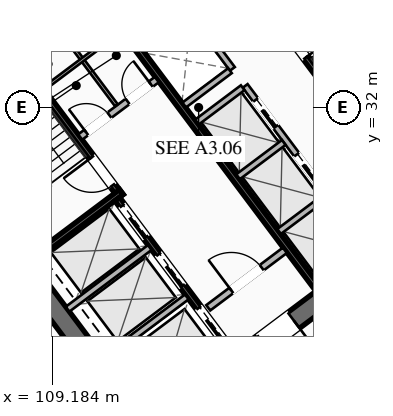
"""IFC4 building model, lengths in metres.
Left out: names, types, materials, properties, quantities, classifications, styles, units other than length and angle.
Written with IfcOpenShell. Run it as: python <this file> out.ifc"""

import sys

from ifc_helpers import new_model, si_unit, direction, frame, frame_2d, origin, place, context, subcontext, project, spatial, rectangle, extrude, element, fill, save


model = new_model("IFC4")
c1 = context("Model", 3, precision=1e-05, world=origin(), true_north=direction((0.0, 1.0)))
c2 = subcontext(c1, "Body", "Model", "MODEL_VIEW")
j1 = project(units=[si_unit("LENGTHUNIT", "METRE"), si_unit("PLANEANGLEUNIT", "RADIAN")], contexts=[c1])
p1 = place(None, origin())
s1 = spatial("IfcSite", under=j1, at=p1, CompositionType="ELEMENT")
p2 = place(p1, origin())
s2 = spatial("IfcBuilding", under=s1, at=p2, CompositionType="ELEMENT")
p3 = place(p2, frame((0.0, 0.0, 88.5)))
s3 = spatial("IfcBuildingStorey", under=s2, at=p3, CompositionType="ELEMENT", Elevation=88.5)
for number, where, z_axis, x_axis in (
    (1, (112.476, 21.107, 0.0), (0.0, 0.0, 1.0), (-0.6, 0.8, 0.0)),
    (2, (115.524, 42.893, 0.0), (0.0, 0.0, 1.0), (0.6, -0.8, 0.0)),
):
    element("IfcWall", number, at=place(p3, frame(where, z_axis=z_axis, x_axis=x_axis)), inside=s3, PredefinedType="SHEAR", context=c2, shape_type="SweptSolid", body=[
        extrude(rectangle(XDim=15.6, YDim=0.65, at=frame_2d((7.8, 0.0))), origin(), (0.0, 0.0, 1.0), 3.55),
    ])
p4 = place(p3, frame((124.429, 30.478, 0.0), z_axis=(0.0, 0.0, 1.0), x_axis=(-0.799998028465, -0.600002628705, 0.0)))
e3 = element("IfcWall", 3, at=p4, inside=s3, PredefinedType="SHEAR", context=c2, shape_type="SweptSolid", body=[
    extrude(rectangle(XDim=14.86, YDim=0.65, at=frame_2d((7.43, 0.0))), origin(), (0.0, 0.0, 1.0), 3.55),
])
p5 = place(p4, frame((9.13, 0.0, 0.0)))
e4 = element("IfcOpeningElement", 4, at=p5, cuts=e3, PredefinedType="OPENING", context=c2, shape_type="SweptSolid", body=[
    extrude(rectangle(XDim=1.25, YDim=2.25, at=frame_2d((0.625, 1.125))), frame((0.0, 0.335, 0.0), z_axis=(0.0, -1.0, 0.0), x_axis=(1.0, 0.0, 0.0)), (0.0, 0.0, 1.0), 0.67),
])
p6 = place(p4, frame((4.08, 0.0, 0.0)))
e5 = element("IfcOpeningElement", 5, at=p6, cuts=e3, PredefinedType="OPENING", context=c2, shape_type="SweptSolid", body=[
    extrude(rectangle(XDim=1.25, YDim=2.25, at=frame_2d((0.625, 1.125))), frame((0.0, 0.335, 0.0), z_axis=(0.0, -1.0, 0.0), x_axis=(1.0, 0.0, 0.0)), (0.0, 0.0, 1.0), 0.67),
])
p7 = place(p3, frame((103.571, 33.522, 0.0), z_axis=(0.0, 0.0, 1.0), x_axis=(0.799998028465, 0.600002628705, 0.0)))
e6 = element("IfcWall", 6, at=p7, inside=s3, PredefinedType="SHEAR", context=c2, shape_type="SweptSolid", body=[
    extrude(rectangle(XDim=14.86, YDim=0.65, at=frame_2d((7.43, 0.0))), origin(), (0.0, 0.0, 1.0), 3.55),
])
p8 = place(p7, frame((4.48, 0.0, 0.0)))
e7 = element("IfcOpeningElement", 7, at=p8, cuts=e6, PredefinedType="OPENING", context=c2, shape_type="SweptSolid", body=[
    extrude(rectangle(XDim=1.25, YDim=2.25, at=frame_2d((0.625, 1.125))), frame((0.0, 0.335, 0.0), z_axis=(0.0, -1.0, 0.0), x_axis=(1.0, 0.0, 0.0)), (0.0, 0.0, 1.0), 0.67),
])
p9 = place(p7, frame((9.53, 0.0, 0.0)))
e8 = element("IfcOpeningElement", 8, at=p9, cuts=e6, PredefinedType="OPENING", context=c2, shape_type="SweptSolid", body=[
    extrude(rectangle(XDim=1.25, YDim=2.25, at=frame_2d((0.625, 1.125))), frame((0.0, 0.335, 0.0), z_axis=(0.0, -1.0, 0.0), x_axis=(1.0, 0.0, 0.0)), (0.0, 0.0, 1.0), 0.67),
])
p10 = place(p3, frame((111.44, 29.08, 0.0), z_axis=(0.0, 0.0, 1.0), x_axis=(-0.600009827119, 0.799992629566, 0.0)))
e9 = element("IfcWall", 9, at=p10, inside=s3, PredefinedType="SHEAR", context=c2, shape_type="SweptSolid", body=[
    extrude(rectangle(XDim=7.95, YDim=0.2, at=frame_2d((3.975, 0.0))), origin(), (0.0, 0.0, 1.0), 3.35),
])
p11 = place(p10, frame((0.45, 0.0, 0.0)))
e10 = element("IfcOpeningElement", 10, at=p11, cuts=e9, PredefinedType="OPENING", context=c2, shape_type="SweptSolid", body=[
    extrude(rectangle(XDim=1.15, YDim=2.2, at=frame_2d((0.575, 1.1))), frame((0.0, 0.11, 0.0), z_axis=(0.0, -1.0, 0.0), x_axis=(1.0, 0.0, 0.0)), (0.0, 0.0, 1.0), 0.22),
])
p12 = place(p3, frame((108.476, 26.982, 0.0), z_axis=(0.0, 0.0, 1.0), x_axis=(0.799984290658, 0.600020945218, 0.0)))
e11 = element("IfcWall", 11, at=p12, inside=s3, PredefinedType="SHEAR", context=c2, shape_type="SweptSolid", body=[
    extrude(rectangle(XDim=3.73, YDim=0.2, at=frame_2d((1.865, 0.0))), origin(), (0.0, 0.0, 1.0), 3.35),
])
p13 = place(p3, frame((116.56, 34.92, 0.0), z_axis=(0.0, 0.0, 1.0), x_axis=(0.600009827119, -0.799992629566, 0.0)))
e12 = element("IfcWall", 12, at=p13, inside=s3, PredefinedType="SHEAR", context=c2, shape_type="SweptSolid", body=[
    extrude(rectangle(XDim=7.95, YDim=0.2, at=frame_2d((3.975, 0.0))), origin(), (0.0, 0.0, 1.0), 3.35),
])
p14 = place(p13, frame((0.45, 0.0, 0.0)))
e13 = element("IfcOpeningElement", 13, at=p14, cuts=e12, PredefinedType="OPENING", context=c2, shape_type="SweptSolid", body=[
    extrude(rectangle(XDim=1.15, YDim=2.2, at=frame_2d((0.575, 1.1))), frame((0.0, 0.11, 0.0), z_axis=(0.0, -1.0, 0.0), x_axis=(1.0, 0.0, 0.0)), (0.0, 0.0, 1.0), 0.22),
])
p15 = place(p3, frame((117.938, 26.016, 0.0), z_axis=(0.0, 0.0, 1.0), x_axis=(-0.600005463273, 0.799995902516, 0.0)))
e14 = element("IfcWall", 14, at=p15, inside=s3, PredefinedType="SHEAR", context=c2, shape_type="SweptSolid", body=[
    extrude(rectangle(XDim=14.3, YDim=0.2, at=frame_2d((7.15, 0.0))), origin(), (0.0, 0.0, 1.0), 3.35),
])
p16 = place(p3, frame((110.104, 31.028, 0.0), z_axis=(0.0, 0.0, 1.0), x_axis=(0.800018601094, 0.59997519774, 0.0)))
e15 = element("IfcWall", 15, at=p16, inside=s3, PredefinedType="SOLIDWALL", context=c2, shape_type="SweptSolid", body=[
    extrude(rectangle(XDim=3.15, YDim=0.22, at=frame_2d((1.575, 0.0))), origin(), (0.0, 0.0, 1.0), 2.703),
])
p17 = place(p16, frame((0.25, 0.0, 0.0)))
e16 = element("IfcOpeningElement", 16, at=p17, cuts=e15, PredefinedType="OPENING", context=c2, shape_type="SweptSolid", body=[
    extrude(rectangle(XDim=0.95, YDim=2.05, at=frame_2d((0.475, 1.025))), frame((0.0, 0.12, 0.0), z_axis=(0.0, -1.0, 0.0), x_axis=(1.0, 0.0, 0.0)), (0.0, 0.0, 1.0), 0.24),
])
p18 = place(p16, frame((1.95, 0.0, 0.0)))
e17 = element("IfcOpeningElement", 17, at=p18, cuts=e15, PredefinedType="OPENING", context=c2, shape_type="SweptSolid", body=[
    extrude(rectangle(XDim=0.95, YDim=2.05, at=frame_2d((0.475, 1.025))), frame((0.0, 0.12, 0.0), z_axis=(0.0, -1.0, 0.0), x_axis=(1.0, 0.0, 0.0)), (0.0, 0.0, 1.0), 0.24),
])
p19 = place(p3, frame((114.316, 25.412, 0.0), z_axis=(0.0, 0.0, 1.0), x_axis=(0.800018601094, 0.59997519774, 0.0)))
e18 = element("IfcWall", 18, at=p19, inside=s3, PredefinedType="SOLIDWALL", context=c2, shape_type="SweptSolid", body=[
    extrude(rectangle(XDim=3.15, YDim=0.22, at=frame_2d((1.575, 0.0))), origin(), (0.0, 0.0, 1.0), 2.703),
])
p20 = place(p19, frame((0.95, 0.0, 0.0)))
e19 = element("IfcOpeningElement", 19, at=p20, cuts=e18, PredefinedType="OPENING", context=c2, shape_type="SweptSolid", body=[
    extrude(rectangle(XDim=1.25, YDim=2.25, at=frame_2d((0.625, 1.125))), frame((0.0, 0.12, 0.0), z_axis=(0.0, -1.0, 0.0), x_axis=(1.0, 0.0, 0.0)), (0.0, 0.0, 1.0), 0.24),
])
p21 = place(p3, frame((115.13, 23.91, 0.0), z_axis=(0.0, 0.0, 1.0), x_axis=(-0.599975393228, 0.800018454488, 0.0)))
e20 = element("IfcWall", 20, at=p21, inside=s3, PredefinedType="SHEAR", context=c2, shape_type="SweptSolid", body=[
    extrude(rectangle(XDim=6.35, YDim=0.2, at=frame_2d((3.175, 0.0))), origin(), (0.0, 0.0, 1.0), 3.35),
])
p22 = place(p21, frame((4.775, 0.0, 0.0)))
e21 = element("IfcOpeningElement", 21, at=p22, cuts=e20, PredefinedType="OPENING", context=c2, shape_type="SweptSolid", body=[
    extrude(rectangle(XDim=1.3, YDim=2.25, at=frame_2d((0.65, 1.125))), frame((0.0, 0.11, 0.0), z_axis=(0.0, -1.0, 0.0), x_axis=(1.0, 0.0, 0.0)), (0.0, 0.0, 1.0), 0.22),
])
p23 = place(p21, frame((2.775, 0.0, 0.0)))
e22 = element("IfcOpeningElement", 22, at=p23, cuts=e20, PredefinedType="OPENING", context=c2, shape_type="SweptSolid", body=[
    extrude(rectangle(XDim=1.3, YDim=2.25, at=frame_2d((0.65, 1.125))), frame((0.0, 0.11, 0.0), z_axis=(0.0, -1.0, 0.0), x_axis=(1.0, 0.0, 0.0)), (0.0, 0.0, 1.0), 0.22),
])
p24 = place(p21, frame((0.575, 0.0, 0.0)))
e23 = element("IfcOpeningElement", 23, at=p24, cuts=e20, PredefinedType="OPENING", context=c2, shape_type="SweptSolid", body=[
    extrude(rectangle(XDim=1.3, YDim=2.25, at=frame_2d((0.65, 1.125))), frame((0.0, 0.11, 0.0), z_axis=(0.0, -1.0, 0.0), x_axis=(1.0, 0.0, 0.0)), (0.0, 0.0, 1.0), 0.22),
])
for number, where, z_axis, x_axis in (
    (24, (110.906, 23.742, 0.0), (0.0, 0.0, 1.0), (0.8, 0.6, 0.0)),
    (25, (109.688, 25.366, 0.0), (0.0, 0.0, 1.0), (0.8, 0.6, 0.0)),
):
    element("IfcWall", number, at=place(p3, frame(where, z_axis=z_axis, x_axis=x_axis)), inside=s3, PredefinedType="SOLIDWALL", context=c2, shape_type="SweptSolid", body=[
        extrude(rectangle(XDim=3.38, YDim=0.2, at=frame_2d((1.69, 0.0))), origin(), (0.0, 0.0, 1.0), 3.35),
    ])
p25 = place(p3, frame((111.296, 32.072, 0.0), z_axis=(0.0, 0.0, 1.0), x_axis=(-0.59995887973, 0.800030838552, 0.0)))
e26 = element("IfcWall", 26, at=p25, inside=s3, PredefinedType="PARTITIONING", context=c2, shape_type="SweptSolid", body=[
    extrude(rectangle(XDim=3.8, YDim=0.11, at=frame_2d((1.9, 0.0))), origin(), (0.0, 0.0, 1.0), 2.703),
])
p26 = place(p3, frame((108.91, 32.62, 0.0), z_axis=(0.0, 0.0, 1.0), x_axis=(0.800018601094, 0.59997519774, 0.0)))
e27 = element("IfcWall", 27, at=p26, inside=s3, PredefinedType="PARTITIONING", context=c2, shape_type="SweptSolid", body=[
    extrude(rectangle(XDim=3.15, YDim=0.11, at=frame_2d((1.575, 0.0))), origin(), (0.0, 0.0, 1.0), 2.703),
])
p27 = place(p3, frame((119.61, 27.27, 0.0), z_axis=(0.0, 0.0, 1.0), x_axis=(-0.600011488909, 0.79999138319, 0.0)))
e28 = element("IfcWall", 28, at=p27, inside=s3, PredefinedType="SOLIDWALL", context=c2, shape_type="SweptSolid", body=[
    extrude(rectangle(XDim=6.8, YDim=0.2, at=frame_2d((3.4, 0.0))), origin(), (0.0, 0.0, 1.0), 3.35),
])
p28 = place(p27, frame((0.625, 0.0, 0.0)))
e29 = element("IfcOpeningElement", 29, at=p28, cuts=e28, PredefinedType="OPENING", context=c2, shape_type="SweptSolid", body=[
    extrude(rectangle(XDim=1.1, YDim=2.2, at=frame_2d((0.55, 1.1))), frame((0.0, 0.11, 0.0), z_axis=(0.0, -1.0, 0.0), x_axis=(1.0, 0.0, 0.0)), (0.0, 0.0, 1.0), 0.22),
])
p29 = place(p27, frame((2.875, 0.0, 0.0)))
e30 = element("IfcOpeningElement", 30, at=p29, cuts=e28, PredefinedType="OPENING", context=c2, shape_type="SweptSolid", body=[
    extrude(rectangle(XDim=1.1, YDim=2.2, at=frame_2d((0.55, 1.1))), frame((0.0, 0.11, 0.0), z_axis=(0.0, -1.0, 0.0), x_axis=(1.0, 0.0, 0.0)), (0.0, 0.0, 1.0), 0.22),
])
p30 = place(p27, frame((5.125, 0.0, 0.0)))
e31 = element("IfcOpeningElement", 31, at=p30, cuts=e28, PredefinedType="OPENING", context=c2, shape_type="SweptSolid", body=[
    extrude(rectangle(XDim=1.1, YDim=2.2, at=frame_2d((0.55, 1.1))), frame((0.0, 0.11, 0.0), z_axis=(0.0, -1.0, 0.0), x_axis=(1.0, 0.0, 0.0)), (0.0, 0.0, 1.0), 0.22),
])
p31 = place(p3, frame((116.646, 27.922, 0.0), z_axis=(0.0, 0.0, 1.0), x_axis=(0.8, 0.6, 0.0)))
e32 = element("IfcWall", 32, at=p31, inside=s3, PredefinedType="SOLIDWALL", context=c2, shape_type="SweptSolid", body=[
    extrude(rectangle(XDim=1.88, YDim=0.2, at=frame_2d((0.94, 0.0))), origin(), (0.0, 0.0, 1.0), 3.35),
])
p32 = place(p3, frame((115.296, 29.722, 0.0), z_axis=(0.0, 0.0, 1.0), x_axis=(0.799984418148, 0.600020775241, 0.0)))
e33 = element("IfcWall", 33, at=p32, inside=s3, PredefinedType="SOLIDWALL", context=c2, shape_type="SweptSolid", body=[
    extrude(rectangle(XDim=1.88, YDim=0.2, at=frame_2d((0.94, 0.0))), origin(), (0.0, 0.0, 1.0), 3.35),
])
p33 = place(p3, frame((113.946, 31.522, 0.0), z_axis=(0.0, 0.0, 1.0), x_axis=(0.8, 0.6, 0.0)))
e34 = element("IfcWall", 34, at=p33, inside=s3, PredefinedType="SOLIDWALL", context=c2, shape_type="SweptSolid", body=[
    extrude(rectangle(XDim=1.88, YDim=0.2, at=frame_2d((0.94, 0.0))), origin(), (0.0, 0.0, 1.0), 3.35),
])
p34 = place(p3, frame((115.11, 33.27, 0.0), z_axis=(0.0, 0.0, 1.0), x_axis=(-0.600011488909, 0.79999138319, 0.0)))
e35 = element("IfcWall", 35, at=p34, inside=s3, PredefinedType="SOLIDWALL", context=c2, shape_type="SweptSolid", body=[
    extrude(rectangle(XDim=6.8, YDim=0.2, at=frame_2d((3.4, 0.0))), origin(), (0.0, 0.0, 1.0), 3.35),
])
p35 = place(p3, frame((113.526, 32.082, 0.0), z_axis=(0.0, 0.0, 1.0), x_axis=(0.800046745961, 0.599937666993, 0.0)))
e36 = element("IfcWall", 36, at=p35, inside=s3, PredefinedType="SOLIDWALL", context=c2, shape_type="SweptSolid", body=[
    extrude(rectangle(XDim=1.88, YDim=0.2, at=frame_2d((0.94, 0.0))), origin(), (0.0, 0.0, 1.0), 3.35),
])
p36 = place(p3, frame((112.176, 33.882, 0.0), z_axis=(0.0, 0.0, 1.0), x_axis=(0.8, 0.6, 0.0)))
e37 = element("IfcWall", 37, at=p36, inside=s3, PredefinedType="SOLIDWALL", context=c2, shape_type="SweptSolid", body=[
    extrude(rectangle(XDim=1.88, YDim=0.2, at=frame_2d((0.94, 0.0))), origin(), (0.0, 0.0, 1.0), 3.35),
])
p37 = place(p3, frame((134.582, 32.974, 0.0), z_axis=(0.0, 0.0, 1.0), x_axis=(-0.799995848831, -0.600005534853, 0.0)))
e38 = element("IfcWall", 38, at=p37, inside=s3, PredefinedType="PARTITIONING", context=c2, shape_type="SweptSolid", body=[
    extrude(rectangle(XDim=28.23, YDim=0.135, at=frame_2d((14.115, 0.0))), origin(), (0.0, 0.0, 1.0), 2.703),
])
p38 = place(p37, frame((26.9, 0.0, 0.0)))
e39 = element("IfcOpeningElement", 39, at=p38, cuts=e38, PredefinedType="OPENING", context=c2, shape_type="SweptSolid", body=[
    extrude(rectangle(XDim=0.95, YDim=2.05, at=frame_2d((0.475, 1.025))), frame((0.0, 0.077, 0.0), z_axis=(0.0, -1.0, 0.0), x_axis=(1.0, 0.0, 0.0)), (0.0, 0.0, 1.0), 0.155),
])
p39 = place(p37, frame((0.38, 0.0, 0.0)))
e40 = element("IfcOpeningElement", 40, at=p39, cuts=e38, PredefinedType="OPENING", context=c2, shape_type="SweptSolid", body=[
    extrude(rectangle(XDim=0.95, YDim=2.05, at=frame_2d((0.475, 1.025))), frame((0.0, 0.077, 0.0), z_axis=(0.0, -1.0, 0.0), x_axis=(1.0, 0.0, 0.0)), (0.0, 0.0, 1.0), 0.155),
])
p40 = place(p3, frame((111.95, 16.1, 0.0), z_axis=(0.0, 0.0, 1.0), x_axis=(-0.600001750902, 0.799998686821, 0.0)))
e41 = element("IfcWall", 41, at=p40, inside=s3, PredefinedType="PARTITIONING", context=c2, shape_type="SweptSolid", body=[
    extrude(rectangle(XDim=22.31, YDim=0.135, at=frame_2d((11.155, 0.0))), origin(), (0.0, 0.0, 1.0), 2.703),
])
p41 = place(p40, frame((0.3, 0.0, 0.0)))
e42 = element("IfcOpeningElement", 42, at=p41, cuts=e41, PredefinedType="OPENING", context=c2, shape_type="SweptSolid", body=[
    extrude(rectangle(XDim=0.95, YDim=2.05, at=frame_2d((0.475, 1.025))), frame((0.0, 0.077, 0.0), z_axis=(0.0, -1.0, 0.0), x_axis=(1.0, 0.0, 0.0)), (0.0, 0.0, 1.0), 0.155),
])
p42 = place(p40, frame((11.272, 0.0, 0.0)))
e43 = element("IfcOpeningElement", 43, at=p42, cuts=e41, PredefinedType="OPENING", context=c2, shape_type="SweptSolid", body=[
    extrude(rectangle(XDim=0.95, YDim=2.05, at=frame_2d((0.475, 1.025))), frame((0.0, 0.077, 0.0), z_axis=(0.0, -1.0, 0.0), x_axis=(1.0, 0.0, 0.0)), (0.0, 0.0, 1.0), 0.155),
])
p43 = place(p40, frame((21.06, 0.0, 0.0)))
e44 = element("IfcOpeningElement", 44, at=p43, cuts=e41, PredefinedType="OPENING", context=c2, shape_type="SweptSolid", body=[
    extrude(rectangle(XDim=0.95, YDim=2.05, at=frame_2d((0.475, 1.025))), frame((0.0, 0.077, 0.0), z_axis=(0.0, -1.0, 0.0), x_axis=(1.0, 0.0, 0.0)), (0.0, 0.0, 1.0), 0.155),
])
p44 = place(p5, origin())
e45 = element("IfcDoor", 45, at=p44, inside=s3, OperationType="SINGLE_SWING_LEFT", PredefinedType="DOOR", context=c2, shape_type="SweptSolid", body=[
    extrude(rectangle(XDim=1.25, YDim=2.25, at=frame_2d((0.625, 1.125))), frame((0.0, 0.025, 0.0), z_axis=(0.0, -1.0, 0.0), x_axis=(1.0, 0.0, 0.0)), (0.0, 0.0, 1.0), 0.05),
])
fill(e4, e45)
p45 = place(p11, origin())
e46 = element("IfcDoor", 46, at=p45, inside=s3, OperationType="SINGLE_SWING_RIGHT", PredefinedType="DOOR", context=c2, shape_type="SweptSolid", body=[
    extrude(rectangle(XDim=1.15, YDim=2.2, at=frame_2d((0.575, 1.1))), frame((0.0, 0.025, 0.0), z_axis=(0.0, -1.0, 0.0), x_axis=(1.0, 0.0, 0.0)), (0.0, 0.0, 1.0), 0.05),
])
fill(e10, e46)
p46 = place(p14, origin())
e47 = element("IfcDoor", 47, at=p46, inside=s3, OperationType="SINGLE_SWING_RIGHT", PredefinedType="DOOR", context=c2, shape_type="SweptSolid", body=[
    extrude(rectangle(XDim=1.15, YDim=2.2, at=frame_2d((0.575, 1.1))), frame((0.0, 0.025, 0.0), z_axis=(0.0, -1.0, 0.0), x_axis=(1.0, 0.0, 0.0)), (0.0, 0.0, 1.0), 0.05),
])
fill(e13, e47)
p47 = place(p20, origin())
e48 = element("IfcDoor", 48, at=p47, inside=s3, OperationType="SINGLE_SWING_LEFT", PredefinedType="DOOR", context=c2, shape_type="SweptSolid", body=[
    extrude(rectangle(XDim=1.25, YDim=2.25, at=frame_2d((0.625, 1.125))), frame((0.0, 0.025, 0.0), z_axis=(0.0, -1.0, 0.0), x_axis=(1.0, 0.0, 0.0)), (0.0, 0.0, 1.0), 0.05),
])
fill(e19, e48)
p48 = place(p17, origin())
e49 = element("IfcDoor", 49, at=p48, inside=s3, OperationType="SINGLE_SWING_LEFT", PredefinedType="DOOR", context=c2, shape_type="SweptSolid", body=[
    extrude(rectangle(XDim=0.95, YDim=2.05, at=frame_2d((0.475, 1.025))), frame((0.0, 0.025, 0.0), z_axis=(0.0, -1.0, 0.0), x_axis=(1.0, 0.0, 0.0)), (0.0, 0.0, 1.0), 0.05),
])
fill(e16, e49)
p49 = place(p18, origin())
e50 = element("IfcDoor", 50, at=p49, inside=s3, OperationType="SINGLE_SWING_RIGHT", PredefinedType="DOOR", context=c2, shape_type="SweptSolid", body=[
    extrude(rectangle(XDim=0.95, YDim=2.05, at=frame_2d((0.475, 1.025))), frame((0.0, 0.025, 0.0), z_axis=(0.0, -1.0, 0.0), x_axis=(1.0, 0.0, 0.0)), (0.0, 0.0, 1.0), 0.05),
])
fill(e17, e50)
p50 = place(p22, origin())
e51 = element("IfcDoor", 51, at=p50, inside=s3, OperationType="SLIDING_TO_LEFT", PredefinedType="DOOR", context=c2, shape_type="SweptSolid", body=[
    extrude(rectangle(XDim=1.3, YDim=2.25, at=frame_2d((0.65, 1.125))), frame((0.0, 0.025, 0.0), z_axis=(0.0, -1.0, 0.0), x_axis=(1.0, 0.0, 0.0)), (0.0, 0.0, 1.0), 0.05),
])
fill(e21, e51)
p51 = place(p23, origin())
e52 = element("IfcDoor", 52, at=p51, inside=s3, OperationType="SLIDING_TO_LEFT", PredefinedType="DOOR", context=c2, shape_type="SweptSolid", body=[
    extrude(rectangle(XDim=1.3, YDim=2.25, at=frame_2d((0.65, 1.125))), frame((0.0, 0.025, 0.0), z_axis=(0.0, -1.0, 0.0), x_axis=(1.0, 0.0, 0.0)), (0.0, 0.0, 1.0), 0.05),
])
fill(e22, e52)
p52 = place(p24, origin())
e53 = element("IfcDoor", 53, at=p52, inside=s3, OperationType="SLIDING_TO_LEFT", PredefinedType="DOOR", context=c2, shape_type="SweptSolid", body=[
    extrude(rectangle(XDim=1.3, YDim=2.25, at=frame_2d((0.65, 1.125))), frame((0.0, 0.025, 0.0), z_axis=(0.0, -1.0, 0.0), x_axis=(1.0, 0.0, 0.0)), (0.0, 0.0, 1.0), 0.05),
])
fill(e23, e53)
p53 = place(p29, origin())
e54 = element("IfcDoor", 54, at=p53, inside=s3, OperationType="SLIDING_TO_LEFT", PredefinedType="DOOR", context=c2, shape_type="SweptSolid", body=[
    extrude(rectangle(XDim=1.1, YDim=2.2, at=frame_2d((0.55, 1.1))), frame((0.0, 0.025, 0.0), z_axis=(0.0, -1.0, 0.0), x_axis=(1.0, 0.0, 0.0)), (0.0, 0.0, 1.0), 0.05),
])
fill(e30, e54)
p54 = place(p30, origin())
e55 = element("IfcDoor", 55, at=p54, inside=s3, OperationType="SLIDING_TO_LEFT", PredefinedType="DOOR", context=c2, shape_type="SweptSolid", body=[
    extrude(rectangle(XDim=1.1, YDim=2.2, at=frame_2d((0.55, 1.1))), frame((0.0, 0.025, 0.0), z_axis=(0.0, -1.0, 0.0), x_axis=(1.0, 0.0, 0.0)), (0.0, 0.0, 1.0), 0.05),
])
fill(e31, e55)
save(model, sys.argv[1])
